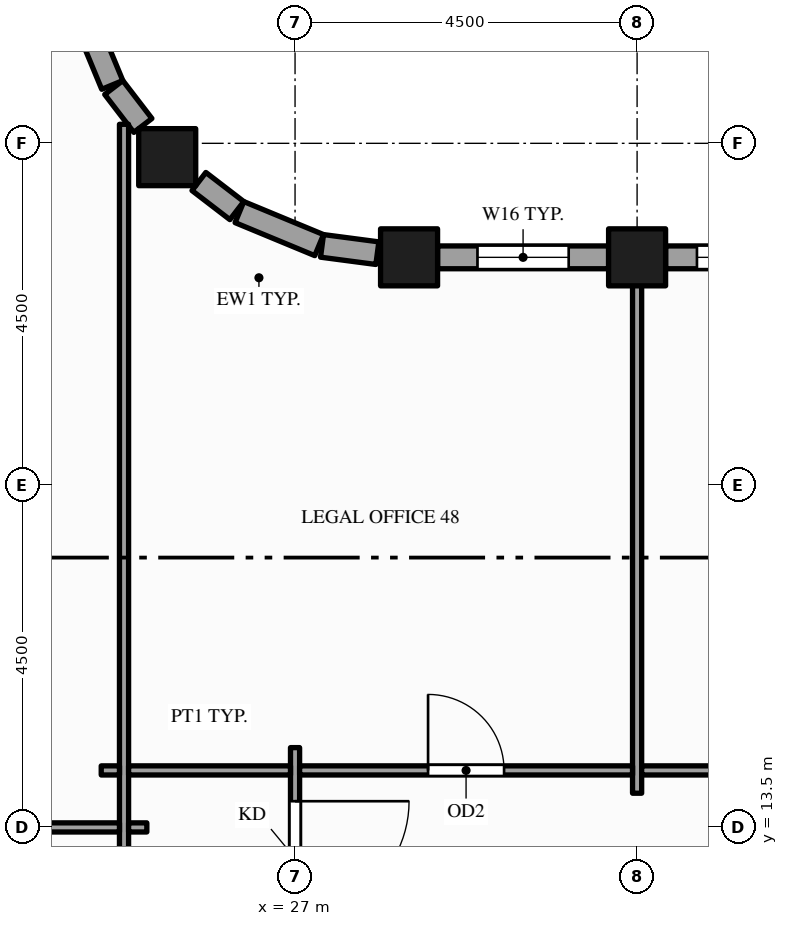
"""IFC4 building model, lengths in metres.
Left out: names, types, materials, properties, quantities, classifications, styles, units other than length and angle.
Written with IfcOpenShell. Run it as: python <this file> out.ifc"""

import sys

from ifc_helpers import new_model, si_unit, direction, frame, frame_2d, origin, origin_2d, place, context, subcontext, project, spatial, rectangle, hollow_rectangle, extrude, element, fill, save


model = new_model("IFC4")
c1 = context("Model", 3, precision=1e-05, world=origin(), true_north=direction((0.0, 1.0)))
c2 = subcontext(c1, "Body", "Model", "MODEL_VIEW")
j1 = project(units=[si_unit("LENGTHUNIT", "METRE"), si_unit("PLANEANGLEUNIT", "RADIAN")], contexts=[c1])
p1 = place(None, origin())
s1 = spatial("IfcSite", under=j1, at=p1, CompositionType="ELEMENT")
p2 = place(p1, origin())
s2 = spatial("IfcBuilding", under=s1, at=p2, CompositionType="ELEMENT")
p3 = place(p2, frame((0.0, 0.0, 235.0)))
s3 = spatial("IfcBuildingStorey", under=s2, at=p3, CompositionType="ELEMENT", Elevation=235.0)
for number, where, z_axis, x_axis in (
    (1, (25.318, 22.318, -0.15), (0.0, 0.0, 1.0), (1.0, 0.0, 0.0)),
    (2, (28.5, 21.0, -0.15), (0.0, 0.0, 1.0), (1.0, 0.0, 0.0)),
    (3, (31.5, 21.0, -0.15), (0.0, 0.0, 1.0), (1.0, 0.0, 0.0)),
):
    element("IfcColumn", number, at=place(p3, frame(where, z_axis=z_axis, x_axis=x_axis)), inside=s3, PredefinedType="COLUMN", context=c2, shape_type="SweptSolid", body=[
        extrude(hollow_rectangle(XDim=0.75, YDim=0.75, WallThickness=0.036, at=origin_2d()), origin(), (0.0, 0.0, 1.0), 4.0),
    ])
p4 = place(p3, frame((35.625, 21.0, 0.0), z_axis=(0.0, 0.0, 1.0), x_axis=(-1.0, 0.0, 0.0)))
e4 = element("IfcWall", 4, at=p4, inside=s3, PredefinedType="STANDARD", context=c2, shape_type="SweptSolid", body=[
    extrude(rectangle(XDim=3.75, YDim=0.3, at=frame_2d((1.875, 0.0))), origin(), (0.0, 0.0, 1.0), 2.87),
])
p5 = place(p4, frame((0.413, 0.0, 0.9)))
e5 = element("IfcOpeningElement", 5, at=p5, cuts=e4, PredefinedType="OPENING", context=c2, shape_type="SweptSolid", body=[
    extrude(rectangle(XDim=1.15, YDim=1.75, at=frame_2d((0.575, 0.875))), frame((0.0, 0.16, 0.0), z_axis=(0.0, -1.0, 0.0), x_axis=(1.0, 0.0, 0.0)), (0.0, 0.0, 1.0), 0.32),
])
p6 = place(p4, frame((2.188, 0.0, 0.9)))
e6 = element("IfcOpeningElement", 6, at=p6, cuts=e4, PredefinedType="OPENING", context=c2, shape_type="SweptSolid", body=[
    extrude(rectangle(XDim=1.15, YDim=1.75, at=frame_2d((0.575, 0.875))), frame((0.0, 0.16, 0.0), z_axis=(0.0, -1.0, 0.0), x_axis=(1.0, 0.0, 0.0)), (0.0, 0.0, 1.0), 0.32),
])
p7 = place(p3, frame((31.125, 21.0, 0.0), z_axis=(0.0, 0.0, 1.0), x_axis=(-1.0, 0.0, 0.0)))
e7 = element("IfcWall", 7, at=p7, inside=s3, PredefinedType="STANDARD", context=c2, shape_type="SweptSolid", body=[
    extrude(rectangle(XDim=2.25, YDim=0.3, at=frame_2d((1.125, 0.0))), origin(), (0.0, 0.0, 1.0), 2.87),
])
p8 = place(p7, frame((0.525, 0.0, 0.9)))
e8 = element("IfcOpeningElement", 8, at=p8, cuts=e7, PredefinedType="OPENING", context=c2, shape_type="SweptSolid", body=[
    extrude(rectangle(XDim=1.2, YDim=1.75, at=frame_2d((0.6, 0.875))), frame((0.0, 0.16, 0.0), z_axis=(0.0, -1.0, 0.0), x_axis=(1.0, 0.0, 0.0)), (0.0, 0.0, 1.0), 0.32),
])
p9 = place(p3, frame((28.083, 21.055, 0.0), z_axis=(0.0, 0.0, 1.0), x_axis=(-0.99142711513, 0.130660917588, 0.0)))
e9 = element("IfcWall", 9, at=p9, inside=s3, PredefinedType="STANDARD", context=c2, shape_type="SweptSolid", body=[
    extrude(rectangle(XDim=0.734, YDim=0.3, at=frame_2d((0.367, 0.0))), origin(), (0.0, 0.0, 1.0), 3.157),
])
p10 = place(p3, frame((27.317, 21.161, 0.0), z_axis=(0.0, 0.0, 1.0), x_axis=(-0.923914616768, 0.382598720491, 0.0)))
e10 = element("IfcWall", 10, at=p10, inside=s3, PredefinedType="STANDARD", context=c2, shape_type="SweptSolid", body=[
    extrude(rectangle(XDim=1.135, YDim=0.3, at=frame_2d((0.568, 0.0))), origin(), (0.0, 0.0, 1.0), 2.87),
])
p11 = place(p3, frame((26.234, 21.615, 0.0), z_axis=(0.0, 0.0, 1.0), x_axis=(-0.793575131083, 0.608472276547, 0.0)))
e11 = element("IfcWall", 11, at=p11, inside=s3, PredefinedType="STANDARD", context=c2, shape_type="SweptSolid", body=[
    extrude(rectangle(XDim=0.629, YDim=0.3, at=frame_2d((0.314, 0.0))), origin(), (0.0, 0.0, 1.0), 3.157),
])
p12 = place(p3, frame((24.998, 22.735, 0.0), z_axis=(0.0, 0.0, 1.0), x_axis=(-0.608472276547, 0.793575131083, 0.0)))
e12 = element("IfcWall", 12, at=p12, inside=s3, PredefinedType="STANDARD", context=c2, shape_type="SweptSolid", body=[
    extrude(rectangle(XDim=0.629, YDim=0.3, at=frame_2d((0.314, 0.0))), origin(), (0.0, 0.0, 1.0), 2.76),
])
p13 = place(p3, frame((24.595, 23.268, 0.0), z_axis=(0.0, 0.0, 1.0), x_axis=(-0.382598720491, 0.923914616768, 0.0)))
e13 = element("IfcWall", 13, at=p13, inside=s3, PredefinedType="STANDARD", context=c2, shape_type="SweptSolid", body=[
    extrude(rectangle(XDim=1.135, YDim=0.3, at=frame_2d((0.568, 0.0))), origin(), (0.0, 0.0, 1.0), 2.76),
])
p14 = place(p3, frame((24.75, -1.35, 0.0), z_axis=(0.0, 0.0, 1.0), x_axis=(0.0, 1.0, 0.0)))
e14 = element("IfcWall", 14, at=p14, inside=s3, PredefinedType="PARTITIONING", context=c2, shape_type="SweptSolid", body=[
    extrude(rectangle(XDim=24.101, YDim=0.12, at=frame_2d((12.05, 0.0))), origin(), (0.0, 0.0, 1.0), 2.76),
])
p15 = place(p14, frame((12.975, 0.0, 0.0)))
e15 = element("IfcOpeningElement", 15, at=p15, cuts=e14, PredefinedType="OPENING", context=c2, shape_type="SweptSolid", body=[
    extrude(rectangle(XDim=1.5, YDim=2.1, at=frame_2d((0.75, 1.05))), frame((0.0, 0.07, 0.0), z_axis=(0.0, -1.0, 0.0), x_axis=(1.0, 0.0, 0.0)), (0.0, 0.0, 1.0), 0.14),
])
p16 = place(p3, frame((27.0, 4.95, 0.0), z_axis=(0.0, 0.0, 1.0), x_axis=(0.0, 1.0, 0.0)))
e16 = element("IfcWall", 16, at=p16, inside=s3, PredefinedType="PARTITIONING", context=c2, shape_type="SweptSolid", body=[
    extrude(rectangle(XDim=9.6, YDim=0.12, at=frame_2d((4.8, 0.0))), origin(), (0.0, 0.0, 1.0), 2.87),
])
p17 = place(p16, frame((0.705, 0.0, 0.0)))
e17 = element("IfcOpeningElement", 17, at=p17, cuts=e16, PredefinedType="OPENING", context=c2, shape_type="SweptSolid", body=[
    extrude(rectangle(XDim=1.5, YDim=2.1, at=frame_2d((0.75, 1.05))), frame((0.0, 0.07, 0.0), z_axis=(0.0, -1.0, 0.0), x_axis=(1.0, 0.0, 0.0)), (0.0, 0.0, 1.0), 0.14),
])
p18 = place(p16, frame((7.395, 0.0, 0.0)))
e18 = element("IfcOpeningElement", 18, at=p18, cuts=e16, PredefinedType="OPENING", context=c2, shape_type="SweptSolid", body=[
    extrude(rectangle(XDim=1.5, YDim=2.1, at=frame_2d((0.75, 1.05))), frame((0.0, 0.07, 0.0), z_axis=(0.0, -1.0, 0.0), x_axis=(1.0, 0.0, 0.0)), (0.0, 0.0, 1.0), 0.14),
])
p19 = place(p3, frame((31.5, 13.95, 0.0), z_axis=(0.0, 0.0, 1.0), x_axis=(0.0, 1.0, 0.0)))
e19 = element("IfcWall", 19, at=p19, inside=s3, PredefinedType="PARTITIONING", context=c2, shape_type="SweptSolid", body=[
    extrude(rectangle(XDim=6.9, YDim=0.12, at=frame_2d((3.45, 0.0))), origin(), (0.0, 0.0, 1.0), 2.87),
])
p20 = place(p3, frame((11.31, 13.5, 0.0), z_axis=(0.0, 0.0, 1.0), x_axis=(1.0, 0.0, 0.0)))
e20 = element("IfcWall", 20, at=p20, inside=s3, PredefinedType="PARTITIONING", context=c2, shape_type="SweptSolid", body=[
    extrude(rectangle(XDim=13.38, YDim=0.12, at=frame_2d((6.69, 0.0))), origin(), (0.0, 0.0, 1.0), 2.76),
])
p21 = place(p20, frame((3.54, 0.0, 0.0)))
e21 = element("IfcOpeningElement", 21, at=p21, cuts=e20, PredefinedType="OPENING", context=c2, shape_type="SweptSolid", body=[
    extrude(rectangle(XDim=1.8, YDim=2.1, at=frame_2d((0.9, 1.05))), frame((0.0, 0.07, 0.0), z_axis=(0.0, -1.0, 0.0), x_axis=(1.0, 0.0, 0.0)), (0.0, 0.0, 1.0), 0.14),
])
for number, where, z_axis, x_axis in (
    (22, (24.81, 13.5, 0.0), (0.0, 0.0, 1.0), (1.0, 0.0, 0.0)),
    (23, (24.45, 14.25, 0.0), (0.0, 0.0, 1.0), (1.0, 0.0, 0.0)),
):
    element("IfcWall", number, at=place(p3, frame(where, z_axis=z_axis, x_axis=x_axis)), inside=s3, PredefinedType="PARTITIONING", context=c2, shape_type="SweptSolid", body=[
        extrude(rectangle(XDim=0.24, YDim=0.12, at=frame_2d((0.12, 0.0))), origin(), (0.0, 0.0, 1.0), 2.76),
    ])
p22 = place(p3, frame((24.81, 14.25, 0.0), z_axis=(0.0, 0.0, 1.0), x_axis=(1.0, 0.0, 0.0)))
e24 = element("IfcWall", 24, at=p22, inside=s3, PredefinedType="PARTITIONING", context=c2, shape_type="SweptSolid", body=[
    extrude(rectangle(XDim=2.13, YDim=0.12, at=frame_2d((1.065, 0.0))), origin(), (0.0, 0.0, 1.0), 2.76),
])
p23 = place(p3, frame((27.06, 14.25, 0.0), z_axis=(0.0, 0.0, 1.0), x_axis=(1.0, 0.0, 0.0)))
e25 = element("IfcWall", 25, at=p23, inside=s3, PredefinedType="PARTITIONING", context=c2, shape_type="SweptSolid", body=[
    extrude(rectangle(XDim=4.38, YDim=0.12, at=frame_2d((2.19, 0.0))), origin(), (0.0, 0.0, 1.0), 2.87),
])
p24 = place(p23, frame((1.69, 0.0, 0.0)))
e26 = element("IfcOpeningElement", 26, at=p24, cuts=e25, PredefinedType="OPENING", context=c2, shape_type="SweptSolid", body=[
    extrude(rectangle(XDim=1.0, YDim=2.1, at=frame_2d((0.5, 1.05))), frame((0.0, 0.07, 0.0), z_axis=(0.0, -1.0, 0.0), x_axis=(1.0, 0.0, 0.0)), (0.0, 0.0, 1.0), 0.14),
])
p25 = place(p3, frame((31.56, 14.25, 0.0), z_axis=(0.0, 0.0, 1.0), x_axis=(1.0, 0.0, 0.0)))
e27 = element("IfcWall", 27, at=p25, inside=s3, PredefinedType="PARTITIONING", context=c2, shape_type="SweptSolid", body=[
    extrude(rectangle(XDim=4.38, YDim=0.12, at=frame_2d((2.19, 0.0))), origin(), (0.0, 0.0, 1.0), 2.87),
])
p26 = place(p25, frame((1.69, 0.0, 0.0)))
e28 = element("IfcOpeningElement", 28, at=p26, cuts=e27, PredefinedType="OPENING", context=c2, shape_type="SweptSolid", body=[
    extrude(rectangle(XDim=1.0, YDim=2.1, at=frame_2d((0.5, 1.05))), frame((0.0, 0.07, 0.0), z_axis=(0.0, -1.0, 0.0), x_axis=(1.0, 0.0, 0.0)), (0.0, 0.0, 1.0), 0.14),
])
p27 = place(p6, origin())
e29 = element("IfcWindow", 29, at=p27, inside=s3, PartitioningType="SINGLE_PANEL", PredefinedType="WINDOW", context=c2, shape_type="SweptSolid", body=[
    extrude(rectangle(XDim=1.15, YDim=1.75, at=frame_2d((0.575, 0.875))), frame((0.0, 0.03, 0.0), z_axis=(0.0, -1.0, 0.0), x_axis=(1.0, 0.0, 0.0)), (0.0, 0.0, 1.0), 0.06),
])
fill(e6, e29)
p28 = place(p8, origin())
e30 = element("IfcWindow", 30, at=p28, inside=s3, PartitioningType="SINGLE_PANEL", PredefinedType="WINDOW", context=c2, shape_type="SweptSolid", body=[
    extrude(rectangle(XDim=1.2, YDim=1.75, at=frame_2d((0.6, 0.875))), frame((0.0, 0.03, 0.0), z_axis=(0.0, -1.0, 0.0), x_axis=(1.0, 0.0, 0.0)), (0.0, 0.0, 1.0), 0.06),
])
fill(e8, e30)
p29 = place(p18, origin())
e31 = element("IfcDoor", 31, at=p29, inside=s3, OperationType="SINGLE_SWING_RIGHT", PredefinedType="DOOR", context=c2, shape_type="SweptSolid", body=[
    extrude(rectangle(XDim=1.5, YDim=2.1, at=frame_2d((0.75, 1.05))), frame((0.0, 0.025, 0.0), z_axis=(0.0, -1.0, 0.0), x_axis=(1.0, 0.0, 0.0)), (0.0, 0.0, 1.0), 0.05),
])
fill(e18, e31)
p30 = place(p24, origin())
e32 = element("IfcDoor", 32, at=p30, inside=s3, OperationType="SINGLE_SWING_LEFT", PredefinedType="DOOR", context=c2, shape_type="SweptSolid", body=[
    extrude(rectangle(XDim=1.0, YDim=2.1, at=frame_2d((0.5, 1.05))), frame((0.0, 0.025, 0.0), z_axis=(0.0, -1.0, 0.0), x_axis=(1.0, 0.0, 0.0)), (0.0, 0.0, 1.0), 0.05),
])
fill(e26, e32)
save(model, sys.argv[1])
